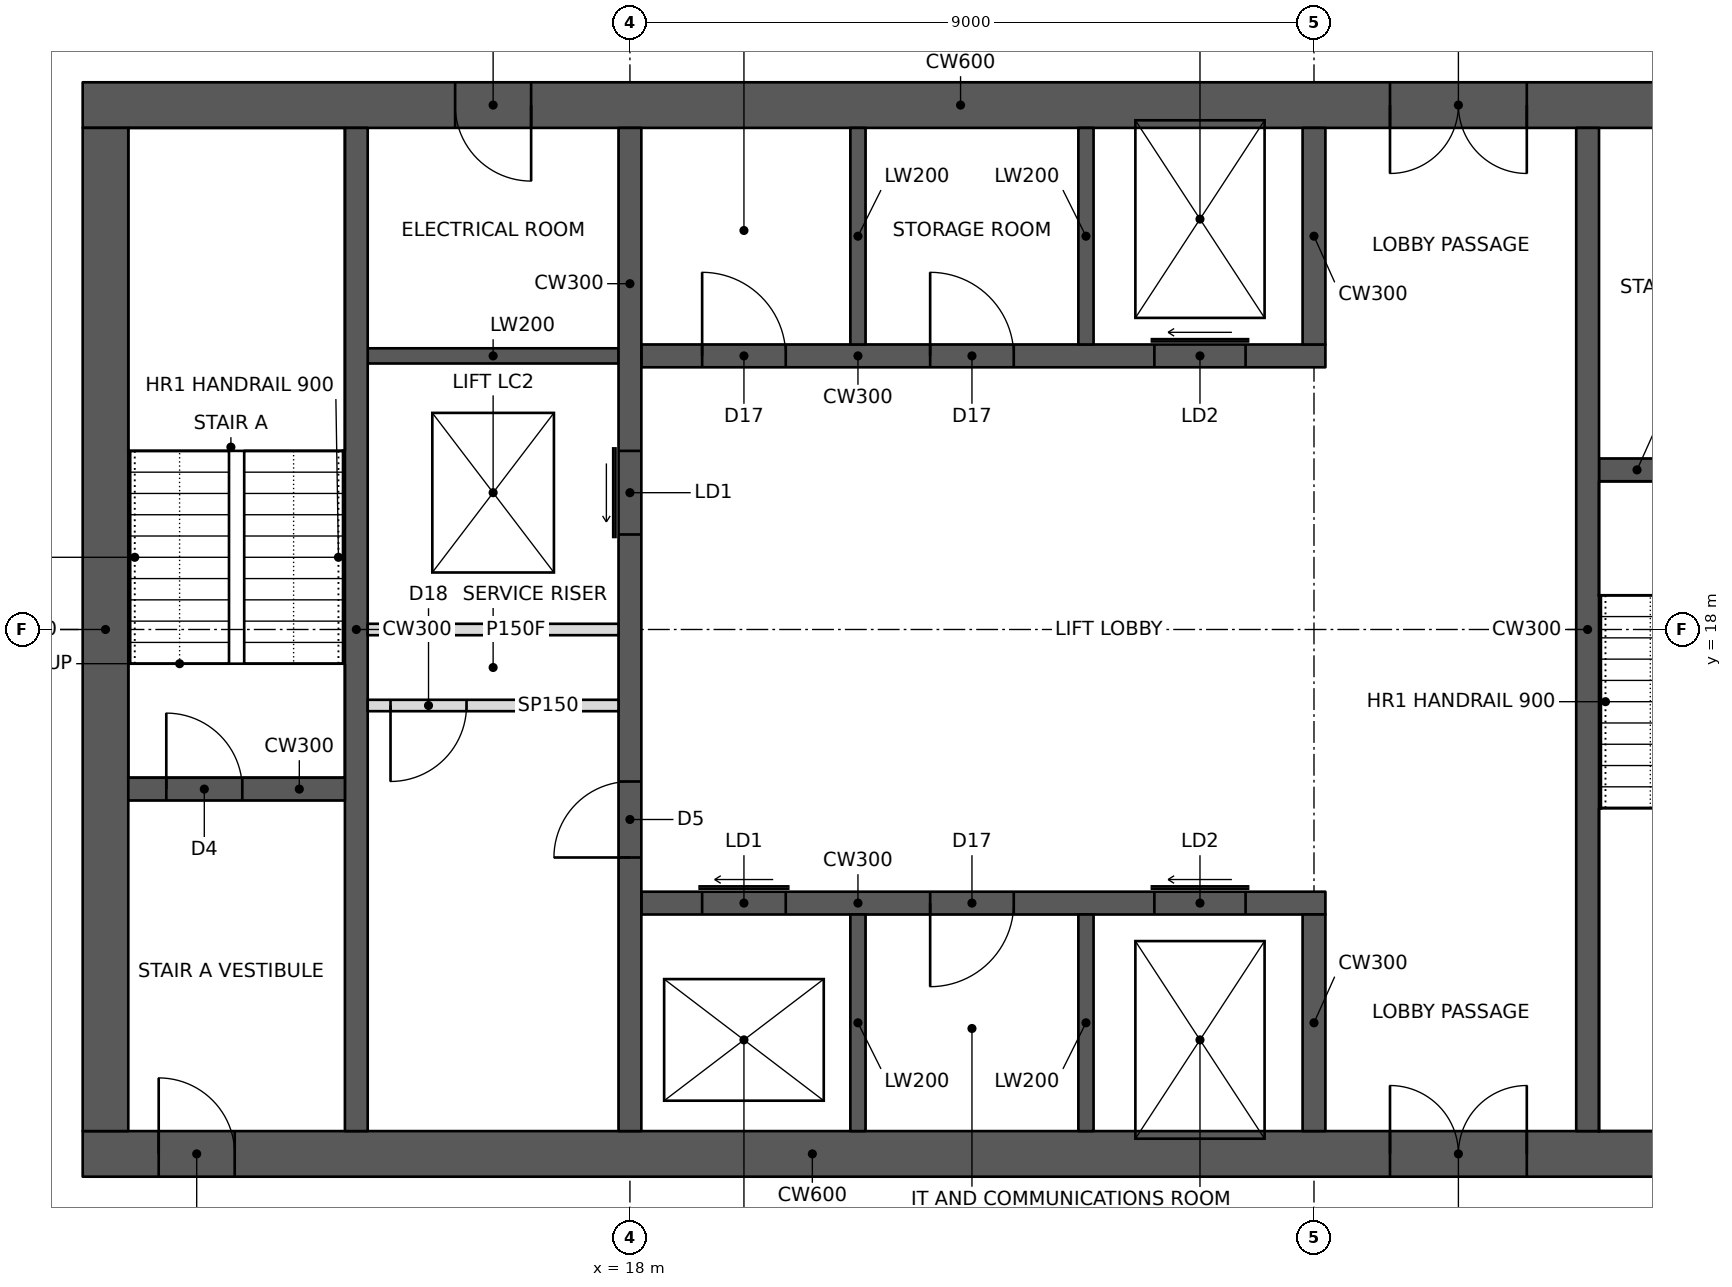
"""IFC4 building model, lengths in metres.
Left out: names, types, materials, properties, quantities, classifications, styles, units other than length and angle.
Written with IfcOpenShell. Run it as: python <this file> out.ifc"""

import sys

from ifc_helpers import new_model, si_unit, direction, frame, frame_2d, origin, place, context, subcontext, project, spatial, rectangle, extrude, element, fill, save


model = new_model("IFC4")
c1 = context("Model", 3, precision=1e-05, world=origin(), true_north=direction((0.0, 1.0)))
c2 = subcontext(c1, "Body", "Model", "MODEL_VIEW")
j1 = project(units=[si_unit("LENGTHUNIT", "METRE"), si_unit("PLANEANGLEUNIT", "RADIAN")], contexts=[c1])
p1 = place(None, origin())
s1 = spatial("IfcSite", under=j1, at=p1, CompositionType="ELEMENT")
p2 = place(p1, origin())
s2 = spatial("IfcBuilding", under=s1, at=p2, CompositionType="ELEMENT")
p3 = place(p2, frame((0.0, 0.0, 259.0)))
s3 = spatial("IfcBuildingStorey", under=s2, at=p3, CompositionType="ELEMENT", Elevation=259.0)
p4 = place(p3, frame((10.8, 11.1, 0.0), z_axis=(0.0, 0.0, 1.0), x_axis=(1.0, 0.0, 0.0)))
e1 = element("IfcWall", 1, at=p4, inside=s3, PredefinedType="SHEAR", context=c2, shape_type="SweptSolid", body=[
    extrude(rectangle(XDim=23.4, YDim=0.6, at=frame_2d((11.7, 0.0))), origin(), (0.0, 0.0, 1.0), 3.6),
])
p5 = place(p4, frame((1.0, 0.0, 0.0)))
e2 = element("IfcOpeningElement", 2, at=p5, cuts=e1, PredefinedType="OPENING", context=c2, shape_type="SweptSolid", body=[
    extrude(rectangle(XDim=1.0, YDim=2.1, at=frame_2d((0.5, 1.05))), frame((0.0, 0.31, 0.0), z_axis=(0.0, -1.0, 0.0), x_axis=(1.0, 0.0, 0.0)), (0.0, 0.0, 1.0), 0.62),
])
p6 = place(p4, frame((17.2, 0.0, 0.0)))
e3 = element("IfcOpeningElement", 3, at=p6, cuts=e1, PredefinedType="OPENING", context=c2, shape_type="SweptSolid", body=[
    extrude(rectangle(XDim=1.8, YDim=2.1, at=frame_2d((0.9, 1.05))), frame((0.0, 0.31, 0.0), z_axis=(0.0, -1.0, 0.0), x_axis=(1.0, 0.0, 0.0)), (0.0, 0.0, 1.0), 0.62),
])
p7 = place(p3, frame((10.8, 24.9, 0.0), z_axis=(0.0, 0.0, 1.0), x_axis=(1.0, 0.0, 0.0)))
e4 = element("IfcWall", 4, at=p7, inside=s3, PredefinedType="SHEAR", context=c2, shape_type="SweptSolid", body=[
    extrude(rectangle(XDim=23.4, YDim=0.6, at=frame_2d((11.7, 0.0))), origin(), (0.0, 0.0, 1.0), 3.6),
])
p8 = place(p7, frame((17.2, 0.0, 0.0)))
e5 = element("IfcOpeningElement", 5, at=p8, cuts=e4, PredefinedType="OPENING", context=c2, shape_type="SweptSolid", body=[
    extrude(rectangle(XDim=1.8, YDim=2.1, at=frame_2d((0.9, 1.05))), frame((0.0, 0.31, 0.0), z_axis=(0.0, -1.0, 0.0), x_axis=(1.0, 0.0, 0.0)), (0.0, 0.0, 1.0), 0.62),
])
p9 = place(p7, frame((21.1, 0.0, 0.0)))
e6 = element("IfcOpeningElement", 6, at=p9, cuts=e4, PredefinedType="OPENING", context=c2, shape_type="SweptSolid", body=[
    extrude(rectangle(XDim=1.0, YDim=2.1, at=frame_2d((0.5, 1.05))), frame((0.0, 0.31, 0.0), z_axis=(0.0, -1.0, 0.0), x_axis=(1.0, 0.0, 0.0)), (0.0, 0.0, 1.0), 0.62),
])
p10 = place(p7, frame((4.9, 0.0, 0.0)))
e7 = element("IfcOpeningElement", 7, at=p10, cuts=e4, PredefinedType="OPENING", context=c2, shape_type="SweptSolid", body=[
    extrude(rectangle(XDim=1.0, YDim=2.1, at=frame_2d((0.5, 1.05))), frame((0.0, 0.31, 0.0), z_axis=(0.0, -1.0, 0.0), x_axis=(1.0, 0.0, 0.0)), (0.0, 0.0, 1.0), 0.62),
])
p11 = place(p3, frame((11.1, 11.4, 0.0), z_axis=(0.0, 0.0, 1.0), x_axis=(0.0, 1.0, 0.0)))
e8 = element("IfcWall", 8, at=p11, inside=s3, PredefinedType="SHEAR", context=c2, shape_type="SweptSolid", body=[
    extrude(rectangle(XDim=13.2, YDim=0.6, at=frame_2d((6.6, 0.0))), origin(), (0.0, 0.0, 1.0), 3.6),
])
p12 = place(p3, frame((14.4, 11.4, 0.0), z_axis=(0.0, 0.0, 1.0), x_axis=(0.0, 1.0, 0.0)))
e9 = element("IfcWall", 9, at=p12, inside=s3, PredefinedType="SHEAR", context=c2, shape_type="SweptSolid", body=[
    extrude(rectangle(XDim=13.2, YDim=0.3, at=frame_2d((6.6, 0.0))), origin(), (0.0, 0.0, 1.0), 3.6),
])
p13 = place(p3, frame((11.4, 15.9, 0.0), z_axis=(0.0, 0.0, 1.0), x_axis=(1.0, 0.0, 0.0)))
e10 = element("IfcWall", 10, at=p13, inside=s3, PredefinedType="SHEAR", context=c2, shape_type="SweptSolid", body=[
    extrude(rectangle(XDim=2.85, YDim=0.3, at=frame_2d((1.425, 0.0))), origin(), (0.0, 0.0, 1.0), 3.6),
])
p14 = place(p13, frame((0.5, 0.0, 0.0)))
e11 = element("IfcOpeningElement", 11, at=p14, cuts=e10, PredefinedType="OPENING", context=c2, shape_type="SweptSolid", body=[
    extrude(rectangle(XDim=1.0, YDim=2.1, at=frame_2d((0.5, 1.05))), frame((0.0, 0.16, 0.0), z_axis=(0.0, -1.0, 0.0), x_axis=(1.0, 0.0, 0.0)), (0.0, 0.0, 1.0), 0.32),
])
p15 = place(p3, frame((18.0, 11.4, 0.0), z_axis=(0.0, 0.0, 1.0), x_axis=(0.0, 1.0, 0.0)))
e12 = element("IfcWall", 12, at=p15, inside=s3, PredefinedType="SHEAR", context=c2, shape_type="SweptSolid", body=[
    extrude(rectangle(XDim=13.2, YDim=0.3, at=frame_2d((6.6, 0.0))), origin(), (0.0, 0.0, 1.0), 3.6),
])
p16 = place(p15, frame((3.6, 0.0, 0.0)))
e13 = element("IfcOpeningElement", 13, at=p16, cuts=e12, PredefinedType="OPENING", context=c2, shape_type="SweptSolid", body=[
    extrude(rectangle(XDim=1.0, YDim=2.1, at=frame_2d((0.5, 1.05))), frame((0.0, 0.16, 0.0), z_axis=(0.0, -1.0, 0.0), x_axis=(1.0, 0.0, 0.0)), (0.0, 0.0, 1.0), 0.32),
])
p17 = place(p15, frame((7.85, 0.0, 0.0)))
e14 = element("IfcOpeningElement", 14, at=p17, cuts=e12, PredefinedType="OPENING", context=c2, shape_type="SweptSolid", body=[
    extrude(rectangle(XDim=1.1, YDim=2.1, at=frame_2d((0.55, 1.05))), frame((0.0, 0.16, 0.0), z_axis=(0.0, -1.0, 0.0), x_axis=(1.0, 0.0, 0.0)), (0.0, 0.0, 1.0), 0.32),
])
p18 = place(p3, frame((14.55, 18.0, 0.0), z_axis=(0.0, 0.0, 1.0), x_axis=(1.0, 0.0, 0.0)))
e15 = element("IfcWall", 15, at=p18, inside=s3, PredefinedType="PARTITIONING", context=c2, shape_type="SweptSolid", body=[
    extrude(rectangle(XDim=3.3, YDim=0.15, at=frame_2d((1.65, 0.0))), origin(), (0.0, 0.0, 1.0), 3.4),
])
p19 = place(p3, frame((18.15, 14.4, 0.0), z_axis=(0.0, 0.0, 1.0), x_axis=(1.0, 0.0, 0.0)))
e16 = element("IfcWall", 16, at=p19, inside=s3, PredefinedType="SHEAR", context=c2, shape_type="SweptSolid", body=[
    extrude(rectangle(XDim=9.0, YDim=0.3, at=frame_2d((4.5, 0.0))), origin(), (0.0, 0.0, 1.0), 3.6),
])
p20 = place(p19, frame((0.8, 0.0, 0.0)))
e17 = element("IfcOpeningElement", 17, at=p20, cuts=e16, PredefinedType="OPENING", context=c2, shape_type="SweptSolid", body=[
    extrude(rectangle(XDim=1.1, YDim=2.1, at=frame_2d((0.55, 1.05))), frame((0.0, 0.16, 0.0), z_axis=(0.0, -1.0, 0.0), x_axis=(1.0, 0.0, 0.0)), (0.0, 0.0, 1.0), 0.32),
])
p21 = place(p19, frame((6.75, 0.0, 0.0)))
e18 = element("IfcOpeningElement", 18, at=p21, cuts=e16, PredefinedType="OPENING", context=c2, shape_type="SweptSolid", body=[
    extrude(rectangle(XDim=1.2, YDim=2.1, at=frame_2d((0.6, 1.05))), frame((0.0, 0.16, 0.0), z_axis=(0.0, -1.0, 0.0), x_axis=(1.0, 0.0, 0.0)), (0.0, 0.0, 1.0), 0.32),
])
p22 = place(p19, frame((3.8, 0.0, 0.0)))
e19 = element("IfcOpeningElement", 19, at=p22, cuts=e16, PredefinedType="OPENING", context=c2, shape_type="SweptSolid", body=[
    extrude(rectangle(XDim=1.1, YDim=2.1, at=frame_2d((0.55, 1.05))), frame((0.0, 0.16, 0.0), z_axis=(0.0, -1.0, 0.0), x_axis=(1.0, 0.0, 0.0)), (0.0, 0.0, 1.0), 0.32),
])
p23 = place(p3, frame((27.0, 11.4, 0.0), z_axis=(0.0, 0.0, 1.0), x_axis=(0.0, 1.0, 0.0)))
e20 = element("IfcWall", 20, at=p23, inside=s3, PredefinedType="SHEAR", context=c2, shape_type="SweptSolid", body=[
    extrude(rectangle(XDim=2.85, YDim=0.3, at=frame_2d((1.425, 0.0))), origin(), (0.0, 0.0, 1.0), 3.6),
])
for number, where, z_axis, x_axis in (
    (21, (21.0, 11.4, 0.0), (0.0, 0.0, 1.0), (0.0, 1.0, 0.0)),
    (22, (24.0, 11.4, 0.0), (0.0, 0.0, 1.0), (0.0, 1.0, 0.0)),
):
    element("IfcWall", number, at=place(p3, frame(where, z_axis=z_axis, x_axis=x_axis)), inside=s3, PredefinedType="SHEAR", context=c2, shape_type="SweptSolid", body=[
        extrude(rectangle(XDim=2.85, YDim=0.2, at=frame_2d((1.425, 0.0))), origin(), (0.0, 0.0, 1.0), 3.6),
    ])
p24 = place(p3, frame((18.15, 21.6, 0.0), z_axis=(0.0, 0.0, 1.0), x_axis=(1.0, 0.0, 0.0)))
e23 = element("IfcWall", 23, at=p24, inside=s3, PredefinedType="SHEAR", context=c2, shape_type="SweptSolid", body=[
    extrude(rectangle(XDim=9.0, YDim=0.3, at=frame_2d((4.5, 0.0))), origin(), (0.0, 0.0, 1.0), 3.6),
])
p25 = place(p24, frame((6.75, 0.0, 0.0)))
e24 = element("IfcOpeningElement", 24, at=p25, cuts=e23, PredefinedType="OPENING", context=c2, shape_type="SweptSolid", body=[
    extrude(rectangle(XDim=1.2, YDim=2.1, at=frame_2d((0.6, 1.05))), frame((0.0, 0.16, 0.0), z_axis=(0.0, -1.0, 0.0), x_axis=(1.0, 0.0, 0.0)), (0.0, 0.0, 1.0), 0.32),
])
p26 = place(p24, frame((0.8, 0.0, 0.0)))
e25 = element("IfcOpeningElement", 25, at=p26, cuts=e23, PredefinedType="OPENING", context=c2, shape_type="SweptSolid", body=[
    extrude(rectangle(XDim=1.1, YDim=2.1, at=frame_2d((0.55, 1.05))), frame((0.0, 0.16, 0.0), z_axis=(0.0, -1.0, 0.0), x_axis=(1.0, 0.0, 0.0)), (0.0, 0.0, 1.0), 0.32),
])
p27 = place(p24, frame((3.8, 0.0, 0.0)))
e26 = element("IfcOpeningElement", 26, at=p27, cuts=e23, PredefinedType="OPENING", context=c2, shape_type="SweptSolid", body=[
    extrude(rectangle(XDim=1.1, YDim=2.1, at=frame_2d((0.55, 1.05))), frame((0.0, 0.16, 0.0), z_axis=(0.0, -1.0, 0.0), x_axis=(1.0, 0.0, 0.0)), (0.0, 0.0, 1.0), 0.32),
])
p28 = place(p3, frame((27.0, 21.75, 0.0), z_axis=(0.0, 0.0, 1.0), x_axis=(0.0, 1.0, 0.0)))
e27 = element("IfcWall", 27, at=p28, inside=s3, PredefinedType="SHEAR", context=c2, shape_type="SweptSolid", body=[
    extrude(rectangle(XDim=2.85, YDim=0.3, at=frame_2d((1.425, 0.0))), origin(), (0.0, 0.0, 1.0), 3.6),
])
for number, where, z_axis, x_axis in (
    (28, (21.0, 21.75, 0.0), (0.0, 0.0, 1.0), (0.0, 1.0, 0.0)),
    (29, (24.0, 21.75, 0.0), (0.0, 0.0, 1.0), (0.0, 1.0, 0.0)),
):
    element("IfcWall", number, at=place(p3, frame(where, z_axis=z_axis, x_axis=x_axis)), inside=s3, PredefinedType="SHEAR", context=c2, shape_type="SweptSolid", body=[
        extrude(rectangle(XDim=2.85, YDim=0.2, at=frame_2d((1.425, 0.0))), origin(), (0.0, 0.0, 1.0), 3.6),
    ])
p29 = place(p3, frame((30.6, 11.4, 0.0), z_axis=(0.0, 0.0, 1.0), x_axis=(0.0, 1.0, 0.0)))
e30 = element("IfcWall", 30, at=p29, inside=s3, PredefinedType="SHEAR", context=c2, shape_type="SweptSolid", body=[
    extrude(rectangle(XDim=13.2, YDim=0.3, at=frame_2d((6.6, 0.0))), origin(), (0.0, 0.0, 1.0), 3.6),
])
p30 = place(p3, frame((30.75, 20.1, 0.0), z_axis=(0.0, 0.0, 1.0), x_axis=(1.0, 0.0, 0.0)))
e31 = element("IfcWall", 31, at=p30, inside=s3, PredefinedType="SHEAR", context=c2, shape_type="SweptSolid", body=[
    extrude(rectangle(XDim=2.85, YDim=0.3, at=frame_2d((1.425, 0.0))), origin(), (0.0, 0.0, 1.0), 3.6),
])
p31 = place(p30, frame((1.15, 0.0, 0.0)))
e32 = element("IfcOpeningElement", 32, at=p31, cuts=e31, PredefinedType="OPENING", context=c2, shape_type="SweptSolid", body=[
    extrude(rectangle(XDim=1.0, YDim=2.1, at=frame_2d((0.5, 1.05))), frame((0.0, 0.16, 0.0), z_axis=(0.0, -1.0, 0.0), x_axis=(1.0, 0.0, 0.0)), (0.0, 0.0, 1.0), 0.32),
])
p32 = place(p3, frame((14.55, 21.6, 0.0), z_axis=(0.0, 0.0, 1.0), x_axis=(1.0, 0.0, 0.0)))
e33 = element("IfcWall", 33, at=p32, inside=s3, PredefinedType="SHEAR", context=c2, shape_type="SweptSolid", body=[
    extrude(rectangle(XDim=3.3, YDim=0.2, at=frame_2d((1.65, 0.0))), origin(), (0.0, 0.0, 1.0), 3.6),
])
p33 = place(p3, frame((14.55, 17.0, 0.0), z_axis=(0.0, 0.0, 1.0), x_axis=(1.0, 0.0, 0.0)))
e34 = element("IfcWall", 34, at=p33, inside=s3, PredefinedType="PARTITIONING", context=c2, shape_type="SweptSolid", body=[
    extrude(rectangle(XDim=3.3, YDim=0.15, at=frame_2d((1.65, 0.0))), origin(), (0.0, 0.0, 1.0), 3.4),
])
p34 = place(p33, frame((0.3, 0.0, 0.0)))
e35 = element("IfcOpeningElement", 35, at=p34, cuts=e34, PredefinedType="OPENING", context=c2, shape_type="SweptSolid", body=[
    extrude(rectangle(XDim=1.0, YDim=2.1, at=frame_2d((0.5, 1.05))), frame((0.0, 0.085, 0.0), z_axis=(0.0, -1.0, 0.0), x_axis=(1.0, 0.0, 0.0)), (0.0, 0.0, 1.0), 0.17),
])
p35 = place(p34, frame((1.0, 0.0, 0.0), z_axis=(0.0, 0.0, 1.0), x_axis=(-1.0, 0.0, 0.0)))
e36 = element("IfcDoor", 36, at=p35, inside=s3, OperationType="SINGLE_SWING_RIGHT", PredefinedType="DOOR", context=c2, shape_type="SweptSolid", body=[
    extrude(rectangle(XDim=1.0, YDim=2.1, at=frame_2d((0.5, 1.05))), frame((0.0, 0.025, 0.0), z_axis=(0.0, -1.0, 0.0), x_axis=(1.0, 0.0, 0.0)), (0.0, 0.0, 1.0), 0.05),
])
fill(e35, e36)
p36 = place(p5, origin())
e37 = element("IfcDoor", 37, at=p36, inside=s3, OperationType="SINGLE_SWING_LEFT", PredefinedType="DOOR", context=c2, shape_type="SweptSolid", body=[
    extrude(rectangle(XDim=1.0, YDim=2.1, at=frame_2d((0.5, 1.05))), frame((0.0, 0.025, 0.0), z_axis=(0.0, -1.0, 0.0), x_axis=(1.0, 0.0, 0.0)), (0.0, 0.0, 1.0), 0.05),
])
fill(e2, e37)
p37 = place(p14, origin())
e38 = element("IfcDoor", 38, at=p37, inside=s3, OperationType="SINGLE_SWING_LEFT", PredefinedType="DOOR", context=c2, shape_type="SweptSolid", body=[
    extrude(rectangle(XDim=1.0, YDim=2.1, at=frame_2d((0.5, 1.05))), frame((0.0, 0.025, 0.0), z_axis=(0.0, -1.0, 0.0), x_axis=(1.0, 0.0, 0.0)), (0.0, 0.0, 1.0), 0.05),
])
fill(e11, e38)
p38 = place(p6, origin())
e39 = element("IfcDoor", 39, at=p38, inside=s3, OperationType="DOUBLE_DOOR_SINGLE_SWING", PredefinedType="DOOR", context=c2, shape_type="SweptSolid", body=[
    extrude(rectangle(XDim=1.8, YDim=2.1, at=frame_2d((0.9, 1.05))), frame((0.0, 0.025, 0.0), z_axis=(0.0, -1.0, 0.0), x_axis=(1.0, 0.0, 0.0)), (0.0, 0.0, 1.0), 0.05),
])
fill(e3, e39)
p39 = place(p8, frame((1.8, 0.0, 0.0), z_axis=(0.0, 0.0, 1.0), x_axis=(-1.0, 0.0, 0.0)))
e40 = element("IfcDoor", 40, at=p39, inside=s3, OperationType="DOUBLE_DOOR_SINGLE_SWING", PredefinedType="DOOR", context=c2, shape_type="SweptSolid", body=[
    extrude(rectangle(XDim=1.8, YDim=2.1, at=frame_2d((0.9, 1.05))), frame((0.0, 0.025, 0.0), z_axis=(0.0, -1.0, 0.0), x_axis=(1.0, 0.0, 0.0)), (0.0, 0.0, 1.0), 0.05),
])
fill(e5, e40)
p40 = place(p16, origin())
e41 = element("IfcDoor", 41, at=p40, inside=s3, OperationType="SINGLE_SWING_LEFT", PredefinedType="DOOR", context=c2, shape_type="SweptSolid", body=[
    extrude(rectangle(XDim=1.0, YDim=2.1, at=frame_2d((0.5, 1.05))), frame((0.0, 0.025, 0.0), z_axis=(0.0, -1.0, 0.0), x_axis=(1.0, 0.0, 0.0)), (0.0, 0.0, 1.0), 0.05),
])
fill(e13, e41)
p41 = place(p10, frame((1.0, 0.0, 0.0), z_axis=(0.0, 0.0, 1.0), x_axis=(-1.0, 0.0, 0.0)))
e42 = element("IfcDoor", 42, at=p41, inside=s3, OperationType="SINGLE_SWING_LEFT", PredefinedType="DOOR", context=c2, shape_type="SweptSolid", body=[
    extrude(rectangle(XDim=1.0, YDim=2.1, at=frame_2d((0.5, 1.05))), frame((0.0, 0.025, 0.0), z_axis=(0.0, -1.0, 0.0), x_axis=(1.0, 0.0, 0.0)), (0.0, 0.0, 1.0), 0.05),
])
fill(e7, e42)
p42 = place(p20, origin())
e43 = element("IfcDoor", 43, at=p42, inside=s3, OperationType="SLIDING_TO_LEFT", PredefinedType="DOOR", context=c2, shape_type="SweptSolid", body=[
    extrude(rectangle(XDim=1.1, YDim=2.1, at=frame_2d((0.55, 1.05))), frame((0.0, 0.025, 0.0), z_axis=(0.0, -1.0, 0.0), x_axis=(1.0, 0.0, 0.0)), (0.0, 0.0, 1.0), 0.05),
])
fill(e17, e43)
p43 = place(p17, origin())
e44 = element("IfcDoor", 44, at=p43, inside=s3, OperationType="SLIDING_TO_LEFT", PredefinedType="DOOR", context=c2, shape_type="SweptSolid", body=[
    extrude(rectangle(XDim=1.1, YDim=2.1, at=frame_2d((0.55, 1.05))), frame((0.0, 0.025, 0.0), z_axis=(0.0, -1.0, 0.0), x_axis=(1.0, 0.0, 0.0)), (0.0, 0.0, 1.0), 0.05),
])
fill(e14, e44)
p44 = place(p21, origin())
e45 = element("IfcDoor", 45, at=p44, inside=s3, OperationType="SLIDING_TO_LEFT", PredefinedType="DOOR", context=c2, shape_type="SweptSolid", body=[
    extrude(rectangle(XDim=1.2, YDim=2.1, at=frame_2d((0.6, 1.05))), frame((0.0, 0.025, 0.0), z_axis=(0.0, -1.0, 0.0), x_axis=(1.0, 0.0, 0.0)), (0.0, 0.0, 1.0), 0.05),
])
fill(e18, e45)
p45 = place(p25, origin())
e46 = element("IfcDoor", 46, at=p45, inside=s3, OperationType="SLIDING_TO_LEFT", PredefinedType="DOOR", context=c2, shape_type="SweptSolid", body=[
    extrude(rectangle(XDim=1.2, YDim=2.1, at=frame_2d((0.6, 1.05))), frame((0.0, 0.025, 0.0), z_axis=(0.0, -1.0, 0.0), x_axis=(1.0, 0.0, 0.0)), (0.0, 0.0, 1.0), 0.05),
])
fill(e24, e46)
p46 = place(p26, origin())
e47 = element("IfcDoor", 47, at=p46, inside=s3, OperationType="SINGLE_SWING_LEFT", PredefinedType="DOOR", context=c2, shape_type="SweptSolid", body=[
    extrude(rectangle(XDim=1.1, YDim=2.1, at=frame_2d((0.55, 1.05))), frame((0.0, 0.025, 0.0), z_axis=(0.0, -1.0, 0.0), x_axis=(1.0, 0.0, 0.0)), (0.0, 0.0, 1.0), 0.05),
])
fill(e25, e47)
p47 = place(p27, origin())
e48 = element("IfcDoor", 48, at=p47, inside=s3, OperationType="SINGLE_SWING_LEFT", PredefinedType="DOOR", context=c2, shape_type="SweptSolid", body=[
    extrude(rectangle(XDim=1.1, YDim=2.1, at=frame_2d((0.55, 1.05))), frame((0.0, 0.025, 0.0), z_axis=(0.0, -1.0, 0.0), x_axis=(1.0, 0.0, 0.0)), (0.0, 0.0, 1.0), 0.05),
])
fill(e26, e48)
p48 = place(p22, frame((1.1, 0.0, 0.0), z_axis=(0.0, 0.0, 1.0), x_axis=(-1.0, 0.0, 0.0)))
e49 = element("IfcDoor", 49, at=p48, inside=s3, OperationType="SINGLE_SWING_RIGHT", PredefinedType="DOOR", context=c2, shape_type="SweptSolid", body=[
    extrude(rectangle(XDim=1.1, YDim=2.1, at=frame_2d((0.55, 1.05))), frame((0.0, 0.025, 0.0), z_axis=(0.0, -1.0, 0.0), x_axis=(1.0, 0.0, 0.0)), (0.0, 0.0, 1.0), 0.05),
])
fill(e19, e49)
save(model, sys.argv[1])
